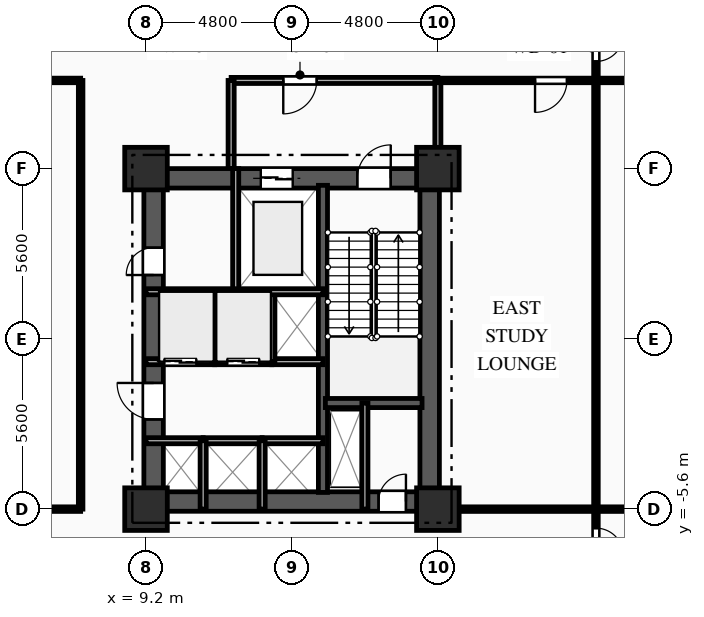
"""IFC4 building model, lengths in metres.
Left out: names, types, materials, properties, quantities, classifications, styles, units other than length and angle.
Written with IfcOpenShell. Run it as: python <this file> out.ifc"""

import sys

from ifc_helpers import new_model, si_unit, direction, frame, frame_2d, origin, origin_2d, place, context, subcontext, project, spatial, rectangle, extrude, element, fill, save


model = new_model("IFC4")
c1 = context("Model", 3, precision=1e-05, world=origin(), true_north=direction((0.0, 1.0)))
c2 = subcontext(c1, "Body", "Model", "MODEL_VIEW")
j1 = project(units=[si_unit("LENGTHUNIT", "METRE"), si_unit("PLANEANGLEUNIT", "RADIAN")], contexts=[c1])
p1 = place(None, origin())
s1 = spatial("IfcSite", under=j1, at=p1, CompositionType="ELEMENT")
p2 = place(p1, origin())
s2 = spatial("IfcBuilding", under=s1, at=p2, CompositionType="ELEMENT")
p3 = place(p2, frame((0.0, 0.0, 22.5)))
s3 = spatial("IfcBuildingStorey", under=s2, at=p3, CompositionType="ELEMENT", Elevation=22.5)
for number, where, z_axis, x_axis in (
    (1, (9.2, -5.6, 0.0), (0.0, 0.0, 1.0), (1.0, 0.0, 0.0)),
    (2, (9.2, 5.6, 0.0), (0.0, 0.0, 1.0), (1.0, 0.0, 0.0)),
    (3, (18.8, -5.6, 0.0), (0.0, 0.0, 1.0), (1.0, 0.0, 0.0)),
    (4, (18.8, 5.6, 0.0), (0.0, 0.0, 1.0), (1.0, 0.0, 0.0)),
):
    element("IfcColumn", number, at=place(p3, frame(where, z_axis=z_axis, x_axis=x_axis)), inside=s3, PredefinedType="COLUMN", context=c2, shape_type="SweptSolid", body=[
        extrude(rectangle(XDim=1.4, YDim=1.4, at=origin_2d()), origin(), (0.0, 0.0, 1.0), 4.5),
    ])
p4 = place(p3, frame((9.2, 5.28, 0.0), z_axis=(0.0, 0.0, 1.0), x_axis=(1.0, 0.0, 0.0)))
e5 = element("IfcWall", 5, at=p4, inside=s3, PredefinedType="SHEAR", context=c2, shape_type="SweptSolid", body=[
    extrude(rectangle(XDim=9.6, YDim=0.64, at=frame_2d((4.8, 0.0))), origin(), (0.0, 0.0, 1.0), 4.16),
])
p5 = place(p4, frame((6.95, 0.0, 0.0)))
e6 = element("IfcOpeningElement", 6, at=p5, cuts=e5, PredefinedType="OPENING", context=c2, shape_type="SweptSolid", body=[
    extrude(rectangle(XDim=1.1, YDim=2.15, at=frame_2d((0.55, 1.075))), frame((0.0, 0.33, 0.0), z_axis=(0.0, -1.0, 0.0), x_axis=(1.0, 0.0, 0.0)), (0.0, 0.0, 1.0), 0.66),
])
p6 = place(p4, frame((3.775, 0.0, 0.0)))
e7 = element("IfcOpeningElement", 7, at=p6, cuts=e5, PredefinedType="OPENING", context=c2, shape_type="SweptSolid", body=[
    extrude(rectangle(XDim=1.05, YDim=2.1, at=frame_2d((0.525, 1.05))), frame((0.0, 0.33, 0.0), z_axis=(0.0, -1.0, 0.0), x_axis=(1.0, 0.0, 0.0)), (0.0, 0.0, 1.0), 0.66),
])
p7 = place(p3, frame((9.2, -5.35, 0.0), z_axis=(0.0, 0.0, 1.0), x_axis=(1.0, 0.0, 0.0)))
e8 = element("IfcWall", 8, at=p7, inside=s3, PredefinedType="SHEAR", context=c2, shape_type="SweptSolid", body=[
    extrude(rectangle(XDim=9.6, YDim=0.64, at=frame_2d((4.8, 0.0))), origin(), (0.0, 0.0, 1.0), 4.16),
])
p8 = place(p7, frame((7.65, 0.0, 0.0)))
e9 = element("IfcOpeningElement", 9, at=p8, cuts=e8, PredefinedType="OPENING", context=c2, shape_type="SweptSolid", body=[
    extrude(rectangle(XDim=0.9, YDim=2.1, at=frame_2d((0.45, 1.05))), frame((0.0, 0.33, 0.0), z_axis=(0.0, -1.0, 0.0), x_axis=(1.0, 0.0, 0.0)), (0.0, 0.0, 1.0), 0.66),
])
p9 = place(p3, frame((9.45, -5.05, 0.0), z_axis=(0.0, 0.0, 1.0), x_axis=(0.0, 1.0, 0.0)))
e10 = element("IfcWall", 10, at=p9, inside=s3, PredefinedType="SHEAR", context=c2, shape_type="SweptSolid", body=[
    extrude(rectangle(XDim=10.1, YDim=0.64, at=frame_2d((5.05, 0.0))), origin(), (0.0, 0.0, 1.0), 4.16),
])
p10 = place(p9, frame((7.15, 0.0, 0.0)))
e11 = element("IfcOpeningElement", 11, at=p10, cuts=e10, PredefinedType="OPENING", context=c2, shape_type="SweptSolid", body=[
    extrude(rectangle(XDim=0.9, YDim=2.1, at=frame_2d((0.45, 1.05))), frame((0.0, 0.33, 0.0), z_axis=(0.0, -1.0, 0.0), x_axis=(1.0, 0.0, 0.0)), (0.0, 0.0, 1.0), 0.66),
])
p11 = place(p9, frame((2.4, 0.0, 0.0)))
e12 = element("IfcOpeningElement", 12, at=p11, cuts=e10, PredefinedType="OPENING", context=c2, shape_type="SweptSolid", body=[
    extrude(rectangle(XDim=1.2, YDim=2.15, at=frame_2d((0.6, 1.075))), frame((0.0, 0.33, 0.0), z_axis=(0.0, -1.0, 0.0), x_axis=(1.0, 0.0, 0.0)), (0.0, 0.0, 1.0), 0.66),
])
p12 = place(p3, frame((18.53, -5.05, 0.0), z_axis=(0.0, 0.0, 1.0), x_axis=(0.0, 1.0, 0.0)))
e13 = element("IfcWall", 13, at=p12, inside=s3, PredefinedType="SHEAR", context=c2, shape_type="SweptSolid", body=[
    extrude(rectangle(XDim=10.1, YDim=0.64, at=frame_2d((5.05, 0.0))), origin(), (0.0, 0.0, 1.0), 4.16),
])
p13 = place(p3, frame((15.02, -5.05, 0.0), z_axis=(0.0, 0.0, 1.0), x_axis=(0.0, 1.0, 0.0)))
e14 = element("IfcWall", 14, at=p13, inside=s3, PredefinedType="SHEAR", context=c2, shape_type="SweptSolid", body=[
    extrude(rectangle(XDim=10.1, YDim=0.3, at=frame_2d((5.05, 0.0))), origin(), (0.0, 0.0, 1.0), 4.16),
])
p14 = place(p3, frame((15.1, -2.11, 0.0), z_axis=(0.0, 0.0, 1.0), x_axis=(1.0, 0.0, 0.0)))
e15 = element("IfcWall", 15, at=p14, inside=s3, PredefinedType="SHEAR", context=c2, shape_type="SweptSolid", body=[
    extrude(rectangle(XDim=3.18, YDim=0.3, at=frame_2d((1.59, 0.0))), origin(), (0.0, 0.0, 1.0), 4.16),
])
p15 = place(p3, frame((16.4, -2.11, 0.0), z_axis=(0.0, 0.0, 1.0), x_axis=(0.0, -1.0, 0.0)))
e16 = element("IfcWall", 16, at=p15, inside=s3, PredefinedType="PARTITIONING", context=c2, shape_type="SweptSolid", body=[
    extrude(rectangle(XDim=3.49, YDim=0.2, at=frame_2d((1.745, 0.0))), origin(), (0.0, 0.0, 1.0), 4.16),
])
p16 = place(p3, frame((12.15, 5.6, 0.0), z_axis=(0.0, 0.0, 1.0), x_axis=(0.0, -1.0, 0.0)))
e17 = element("IfcWall", 17, at=p16, inside=s3, PredefinedType="PARTITIONING", context=c2, shape_type="SweptSolid", body=[
    extrude(rectangle(XDim=4.05, YDim=0.2, at=frame_2d((2.025, 0.0))), origin(), (0.0, 0.0, 1.0), 4.16),
])
p17 = place(p3, frame((18.8, 8.5, 0.0), z_axis=(0.0, 0.0, 1.0), x_axis=(-1.0, 0.0, 0.0)))
e18 = element("IfcWall", 18, at=p17, inside=s3, PredefinedType="PARTITIONING", context=c2, shape_type="SweptSolid", body=[
    extrude(rectangle(XDim=6.8, YDim=0.2, at=frame_2d((3.4, 0.0))), origin(), (0.0, 0.0, 1.0), 4.16),
])
p18 = place(p17, frame((3.985, 0.0, 0.0)))
e19 = element("IfcOpeningElement", 19, at=p18, cuts=e18, PredefinedType="OPENING", context=c2, shape_type="SweptSolid", body=[
    extrude(rectangle(XDim=1.1, YDim=2.15, at=frame_2d((0.55, 1.075))), frame((0.0, 0.11, 0.0), z_axis=(0.0, -1.0, 0.0), x_axis=(1.0, 0.0, 0.0)), (0.0, 0.0, 1.0), 0.22),
])
p19 = place(p3, frame((12.0, 8.5, 0.0), z_axis=(0.0, 0.0, 1.0), x_axis=(0.0, -1.0, 0.0)))
e20 = element("IfcWall", 20, at=p19, inside=s3, PredefinedType="PARTITIONING", context=c2, shape_type="SweptSolid", body=[
    extrude(rectangle(XDim=2.9, YDim=0.2, at=frame_2d((1.45, 0.0))), origin(), (0.0, 0.0, 1.0), 4.16),
])
p20 = place(p3, frame((18.8, 5.6, 0.0), z_axis=(0.0, 0.0, 1.0), x_axis=(0.0, 1.0, 0.0)))
e21 = element("IfcWall", 21, at=p20, inside=s3, PredefinedType="PARTITIONING", context=c2, shape_type="SweptSolid", body=[
    extrude(rectangle(XDim=2.9, YDim=0.2, at=frame_2d((1.45, 0.0))), origin(), (0.0, 0.0, 1.0), 3.645),
])
p21 = place(p3, frame((9.2, -3.35, 0.0), z_axis=(0.0, 0.0, 1.0), x_axis=(1.0, 0.0, 0.0)))
e22 = element("IfcWall", 22, at=p21, inside=s3, PredefinedType="PARTITIONING", context=c2, shape_type="SweptSolid", body=[
    extrude(rectangle(XDim=1.88, YDim=0.2, at=frame_2d((0.94, 0.0))), origin(), (0.0, 0.0, 1.0), 3.875),
])
p22 = place(p3, frame((11.08, -3.35, 0.0), z_axis=(0.0, 0.0, 1.0), x_axis=(1.0, 0.0, 0.0)))
e23 = element("IfcWall", 23, at=p22, inside=s3, PredefinedType="PARTITIONING", context=c2, shape_type="SweptSolid", body=[
    extrude(rectangle(XDim=1.94, YDim=0.2, at=frame_2d((0.97, 0.0))), origin(), (0.0, 0.0, 1.0), 4.16),
])
p23 = place(p3, frame((13.02, -3.35, 0.0), z_axis=(0.0, 0.0, 1.0), x_axis=(1.0, 0.0, 0.0)))
e24 = element("IfcWall", 24, at=p23, inside=s3, PredefinedType="PARTITIONING", context=c2, shape_type="SweptSolid", body=[
    extrude(rectangle(XDim=2.0, YDim=0.2, at=frame_2d((1.0, 0.0))), origin(), (0.0, 0.0, 1.0), 4.16),
])
p24 = place(p3, frame((11.46, -0.75, 0.0), z_axis=(0.0, 0.0, 1.0), x_axis=(-1.0, 0.0, 0.0)))
e25 = element("IfcWall", 25, at=p24, inside=s3, PredefinedType="PARTITIONING", context=c2, shape_type="SweptSolid", body=[
    extrude(rectangle(XDim=2.26, YDim=0.2, at=frame_2d((1.13, 0.0))), origin(), (0.0, 0.0, 1.0), 4.16),
])
p25 = place(p24, frame((0.605, 0.0, 0.0)))
e26 = element("IfcOpeningElement", 26, at=p25, cuts=e25, PredefinedType="OPENING", context=c2, shape_type="SweptSolid", body=[
    extrude(rectangle(XDim=1.05, YDim=2.1, at=frame_2d((0.525, 1.05))), frame((0.0, 0.11, 0.0), z_axis=(0.0, -1.0, 0.0), x_axis=(1.0, 0.0, 0.0)), (0.0, 0.0, 1.0), 0.22),
])
p26 = place(p3, frame((13.34, -0.75, 0.0), z_axis=(0.0, 0.0, 1.0), x_axis=(-1.0, 0.0, 0.0)))
e27 = element("IfcWall", 27, at=p26, inside=s3, PredefinedType="PARTITIONING", context=c2, shape_type="SweptSolid", body=[
    extrude(rectangle(XDim=1.88, YDim=0.2, at=frame_2d((0.94, 0.0))), origin(), (0.0, 0.0, 1.0), 4.16),
])
p27 = place(p26, frame((0.415, 0.0, 0.0)))
e28 = element("IfcOpeningElement", 28, at=p27, cuts=e27, PredefinedType="OPENING", context=c2, shape_type="SweptSolid", body=[
    extrude(rectangle(XDim=1.05, YDim=2.1, at=frame_2d((0.525, 1.05))), frame((0.0, 0.11, 0.0), z_axis=(0.0, -1.0, 0.0), x_axis=(1.0, 0.0, 0.0)), (0.0, 0.0, 1.0), 0.22),
])
p28 = place(p3, frame((15.02, -0.75, 0.0), z_axis=(0.0, 0.0, 1.0), x_axis=(-1.0, 0.0, 0.0)))
e29 = element("IfcWall", 29, at=p28, inside=s3, PredefinedType="PARTITIONING", context=c2, shape_type="SweptSolid", body=[
    extrude(rectangle(XDim=1.68, YDim=0.2, at=frame_2d((0.84, 0.0))), origin(), (0.0, 0.0, 1.0), 4.16),
])
for number, where, z_axis, x_axis in (
    (30, (11.08, -5.6, 0.0), (0.0, 0.0, 1.0), (0.0, 1.0, 0.0)),
    (31, (13.02, -5.6, 0.0), (0.0, 0.0, 1.0), (0.0, 1.0, 0.0)),
):
    element("IfcWall", number, at=place(p3, frame(where, z_axis=z_axis, x_axis=x_axis)), inside=s3, PredefinedType="PARTITIONING", context=c2, shape_type="SweptSolid", body=[
        extrude(rectangle(XDim=2.25, YDim=0.2, at=frame_2d((1.125, 0.0))), origin(), (0.0, 0.0, 1.0), 4.16),
    ])
for number, where, z_axis, x_axis in (
    (32, (11.46, -0.75, 0.0), (0.0, 0.0, 1.0), (0.0, 1.0, 0.0)),
    (33, (13.34, -0.75, 0.0), (0.0, 0.0, 1.0), (0.0, 1.0, 0.0)),
):
    element("IfcWall", number, at=place(p3, frame(where, z_axis=z_axis, x_axis=x_axis)), inside=s3, PredefinedType="PARTITIONING", context=c2, shape_type="SweptSolid", body=[
        extrude(rectangle(XDim=2.3, YDim=0.2, at=frame_2d((1.15, 0.0))), origin(), (0.0, 0.0, 1.0), 4.16),
    ])
p29 = place(p3, frame((24.0, 10.65, 0.0), z_axis=(0.0, 0.0, 1.0), x_axis=(0.0, -1.0, 0.0)))
e34 = element("IfcWall", 34, at=p29, inside=s3, PredefinedType="PARTITIONING", context=c2, shape_type="SweptSolid", body=[
    extrude(rectangle(XDim=2.15, YDim=0.15, at=frame_2d((1.075, 0.0))), origin(), (0.0, 0.0, 1.0), 4.16),
])
p30 = place(p29, frame((0.625, 0.0, 0.0)))
e35 = element("IfcOpeningElement", 35, at=p30, cuts=e34, PredefinedType="OPENING", context=c2, shape_type="SweptSolid", body=[
    extrude(rectangle(XDim=0.9, YDim=2.1, at=frame_2d((0.45, 1.05))), frame((0.0, 0.085, 0.0), z_axis=(0.0, -1.0, 0.0), x_axis=(1.0, 0.0, 0.0)), (0.0, 0.0, 1.0), 0.17),
])
p31 = place(p3, frame((24.0, 8.5, 0.0), z_axis=(0.0, 0.0, 1.0), x_axis=(-1.0, 0.0, 0.0)))
e36 = element("IfcWall", 36, at=p31, inside=s3, PredefinedType="PARTITIONING", context=c2, shape_type="SweptSolid", body=[
    extrude(rectangle(XDim=5.2, YDim=0.15, at=frame_2d((2.6, 0.0))), origin(), (0.0, 0.0, 1.0), 4.16),
])
p32 = place(p31, frame((0.954, 0.0, 0.0)))
e37 = element("IfcOpeningElement", 37, at=p32, cuts=e36, PredefinedType="OPENING", context=c2, shape_type="SweptSolid", body=[
    extrude(rectangle(XDim=1.05, YDim=2.15, at=frame_2d((0.525, 1.075))), frame((0.0, 0.085, 0.0), z_axis=(0.0, -1.0, 0.0), x_axis=(1.0, 0.0, 0.0)), (0.0, 0.0, 1.0), 0.17),
])
p33 = place(p3, frame((7.05, 8.5, 0.0), z_axis=(0.0, 0.0, 1.0), x_axis=(-1.0, 0.0, 0.0)))
e38 = element("IfcWall", 38, at=p33, inside=s3, PredefinedType="PARTITIONING", context=c2, shape_type="SweptSolid", body=[
    extrude(rectangle(XDim=7.05, YDim=0.15, at=frame_2d((3.525, 0.0))), origin(), (0.0, 0.0, 1.0), 4.16),
])
p34 = place(p3, frame((24.0, -5.6, 0.0), z_axis=(0.0, 0.0, 1.0), x_axis=(0.0, -1.0, 0.0)))
e39 = element("IfcWall", 39, at=p34, inside=s3, PredefinedType="PARTITIONING", context=c2, shape_type="SweptSolid", body=[
    extrude(rectangle(XDim=2.15, YDim=0.15, at=frame_2d((1.075, 0.0))), origin(), (0.0, 0.0, 1.0), 4.16),
])
p35 = place(p34, frame((0.625, 0.0, 0.0)))
e40 = element("IfcOpeningElement", 40, at=p35, cuts=e39, PredefinedType="OPENING", context=c2, shape_type="SweptSolid", body=[
    extrude(rectangle(XDim=0.9, YDim=2.1, at=frame_2d((0.45, 1.05))), frame((0.0, 0.085, 0.0), z_axis=(0.0, -1.0, 0.0), x_axis=(1.0, 0.0, 0.0)), (0.0, 0.0, 1.0), 0.17),
])
p36 = place(p3, frame((18.8, -5.6, 0.0), z_axis=(0.0, 0.0, 1.0), x_axis=(1.0, 0.0, 0.0)))
e41 = element("IfcWall", 41, at=p36, inside=s3, PredefinedType="PARTITIONING", context=c2, shape_type="SweptSolid", body=[
    extrude(rectangle(XDim=5.2, YDim=0.15, at=frame_2d((2.6, 0.0))), origin(), (0.0, 0.0, 1.0), 4.16),
])
p37 = place(p3, frame((0.0, -5.6, 0.0), z_axis=(0.0, 0.0, 1.0), x_axis=(1.0, 0.0, 0.0)))
e42 = element("IfcWall", 42, at=p37, inside=s3, PredefinedType="PARTITIONING", context=c2, shape_type="SweptSolid", body=[
    extrude(rectangle(XDim=7.05, YDim=0.15, at=frame_2d((3.525, 0.0))), origin(), (0.0, 0.0, 1.0), 3.137),
])
p38 = place(p3, frame((7.05, -5.6, 0.0), z_axis=(0.0, 0.0, 1.0), x_axis=(0.0, 1.0, 0.0)))
e43 = element("IfcWall", 43, at=p38, inside=s3, PredefinedType="PARTITIONING", context=c2, shape_type="SweptSolid", body=[
    extrude(rectangle(XDim=14.1, YDim=0.15, at=frame_2d((7.05, 0.0))), origin(), (0.0, 0.0, 1.0), 4.16),
])
p39 = place(p3, frame((24.0, 8.5, 0.0), z_axis=(0.0, 0.0, 1.0), x_axis=(1.0, 0.0, 0.0)))
e44 = element("IfcWall", 44, at=p39, inside=s3, PredefinedType="PARTITIONING", context=c2, shape_type="SweptSolid", body=[
    extrude(rectangle(XDim=2.65, YDim=0.15, at=frame_2d((1.325, 0.0))), origin(), (0.0, 0.0, 1.0), 4.16),
])
p40 = place(p39, frame((0.965, 0.0, 0.0)))
e45 = element("IfcOpeningElement", 45, at=p40, cuts=e44, PredefinedType="OPENING", context=c2, shape_type="SweptSolid", body=[
    extrude(rectangle(XDim=1.05, YDim=2.15, at=frame_2d((0.525, 1.075))), frame((0.0, 0.085, 0.0), z_axis=(0.0, -1.0, 0.0), x_axis=(1.0, 0.0, 0.0)), (0.0, 0.0, 1.0), 0.17),
])
p41 = place(p3, frame((26.65, -5.6, 0.0), z_axis=(0.0, 0.0, 1.0), x_axis=(-1.0, 0.0, 0.0)))
e46 = element("IfcWall", 46, at=p41, inside=s3, PredefinedType="PARTITIONING", context=c2, shape_type="SweptSolid", body=[
    extrude(rectangle(XDim=2.65, YDim=0.15, at=frame_2d((1.325, 0.0))), origin(), (0.0, 0.0, 1.0), 4.16),
])
p42 = place(p41, frame((0.635, 0.0, 0.0)))
e47 = element("IfcOpeningElement", 47, at=p42, cuts=e46, PredefinedType="OPENING", context=c2, shape_type="SweptSolid", body=[
    extrude(rectangle(XDim=1.05, YDim=2.15, at=frame_2d((0.525, 1.075))), frame((0.0, 0.085, 0.0), z_axis=(0.0, -1.0, 0.0), x_axis=(1.0, 0.0, 0.0)), (0.0, 0.0, 1.0), 0.17),
])
p43 = place(p3, frame((24.0, -5.6, 0.0), z_axis=(0.0, 0.0, 1.0), x_axis=(0.0, 1.0, 0.0)))
e48 = element("IfcWall", 48, at=p43, inside=s3, PredefinedType="PARTITIONING", context=c2, shape_type="SweptSolid", body=[
    extrude(rectangle(XDim=14.1, YDim=0.15, at=frame_2d((7.05, 0.0))), origin(), (0.0, 0.0, 1.0), 4.16),
])
p44 = place(p3, frame((9.2, 1.55, 0.0), z_axis=(0.0, 0.0, 1.0), x_axis=(1.0, 0.0, 0.0)))
e49 = element("IfcWall", 49, at=p44, inside=s3, PredefinedType="PARTITIONING", context=c2, shape_type="SweptSolid", body=[
    extrude(rectangle(XDim=5.82, YDim=0.2, at=frame_2d((2.91, 0.0))), origin(), (0.0, 0.0, 1.0), 4.16),
])
p45 = place(p5, origin())
e50 = element("IfcDoor", 50, at=p45, inside=s3, OperationType="SINGLE_SWING_RIGHT", PredefinedType="DOOR", context=c2, shape_type="SweptSolid", body=[
    extrude(rectangle(XDim=1.1, YDim=2.15, at=frame_2d((0.55, 1.075))), frame((0.0, 0.025, 0.0), z_axis=(0.0, -1.0, 0.0), x_axis=(1.0, 0.0, 0.0)), (0.0, 0.0, 1.0), 0.05),
])
fill(e6, e50)
p46 = place(p6, origin())
e51 = element("IfcDoor", 51, at=p46, inside=s3, OperationType="DOUBLE_DOOR_SLIDING", PredefinedType="DOOR", context=c2, shape_type="SweptSolid", body=[
    extrude(rectangle(XDim=1.05, YDim=2.1, at=frame_2d((0.525, 1.05))), frame((0.0, 0.025, 0.0), z_axis=(0.0, -1.0, 0.0), x_axis=(1.0, 0.0, 0.0)), (0.0, 0.0, 1.0), 0.05),
])
fill(e7, e51)
p47 = place(p8, origin())
e52 = element("IfcDoor", 52, at=p47, inside=s3, OperationType="SINGLE_SWING_RIGHT", PredefinedType="DOOR", context=c2, shape_type="SweptSolid", body=[
    extrude(rectangle(XDim=0.9, YDim=2.1, at=frame_2d((0.45, 1.05))), frame((0.0, 0.025, 0.0), z_axis=(0.0, -1.0, 0.0), x_axis=(1.0, 0.0, 0.0)), (0.0, 0.0, 1.0), 0.05),
])
fill(e9, e52)
p48 = place(p18, origin())
e53 = element("IfcDoor", 53, at=p48, inside=s3, OperationType="SINGLE_SWING_RIGHT", PredefinedType="DOOR", context=c2, shape_type="SweptSolid", body=[
    extrude(rectangle(XDim=1.1, YDim=2.15, at=frame_2d((0.55, 1.075))), frame((0.0, 0.025, 0.0), z_axis=(0.0, -1.0, 0.0), x_axis=(1.0, 0.0, 0.0)), (0.0, 0.0, 1.0), 0.05),
])
fill(e19, e53)
p49 = place(p10, origin())
e54 = element("IfcDoor", 54, at=p49, inside=s3, OperationType="SINGLE_SWING_LEFT", PredefinedType="DOOR", context=c2, shape_type="SweptSolid", body=[
    extrude(rectangle(XDim=0.9, YDim=2.1, at=frame_2d((0.45, 1.05))), frame((0.0, 0.025, 0.0), z_axis=(0.0, -1.0, 0.0), x_axis=(1.0, 0.0, 0.0)), (0.0, 0.0, 1.0), 0.05),
])
fill(e11, e54)
p50 = place(p25, origin())
e55 = element("IfcDoor", 55, at=p50, inside=s3, OperationType="DOUBLE_DOOR_SLIDING", PredefinedType="DOOR", context=c2, shape_type="SweptSolid", body=[
    extrude(rectangle(XDim=1.05, YDim=2.1, at=frame_2d((0.525, 1.05))), frame((0.0, 0.025, 0.0), z_axis=(0.0, -1.0, 0.0), x_axis=(1.0, 0.0, 0.0)), (0.0, 0.0, 1.0), 0.05),
])
fill(e26, e55)
p51 = place(p27, origin())
e56 = element("IfcDoor", 56, at=p51, inside=s3, OperationType="DOUBLE_DOOR_SLIDING", PredefinedType="DOOR", context=c2, shape_type="SweptSolid", body=[
    extrude(rectangle(XDim=1.05, YDim=2.1, at=frame_2d((0.525, 1.05))), frame((0.0, 0.025, 0.0), z_axis=(0.0, -1.0, 0.0), x_axis=(1.0, 0.0, 0.0)), (0.0, 0.0, 1.0), 0.05),
])
fill(e28, e56)
p52 = place(p11, origin())
e57 = element("IfcDoor", 57, at=p52, inside=s3, OperationType="SINGLE_SWING_RIGHT", PredefinedType="DOOR", context=c2, shape_type="SweptSolid", body=[
    extrude(rectangle(XDim=1.2, YDim=2.15, at=frame_2d((0.6, 1.075))), frame((0.0, 0.025, 0.0), z_axis=(0.0, -1.0, 0.0), x_axis=(1.0, 0.0, 0.0)), (0.0, 0.0, 1.0), 0.05),
])
fill(e12, e57)
p53 = place(p30, origin())
e58 = element("IfcDoor", 58, at=p53, inside=s3, OperationType="SINGLE_SWING_LEFT", PredefinedType="DOOR", context=c2, shape_type="SweptSolid", body=[
    extrude(rectangle(XDim=0.9, YDim=2.1, at=frame_2d((0.45, 1.05))), frame((0.0, 0.025, 0.0), z_axis=(0.0, -1.0, 0.0), x_axis=(1.0, 0.0, 0.0)), (0.0, 0.0, 1.0), 0.05),
])
fill(e35, e58)
p54 = place(p32, origin())
e59 = element("IfcDoor", 59, at=p54, inside=s3, OperationType="SINGLE_SWING_RIGHT", PredefinedType="DOOR", context=c2, shape_type="SweptSolid", body=[
    extrude(rectangle(XDim=1.05, YDim=2.15, at=frame_2d((0.525, 1.075))), frame((0.0, 0.025, 0.0), z_axis=(0.0, -1.0, 0.0), x_axis=(1.0, 0.0, 0.0)), (0.0, 0.0, 1.0), 0.05),
])
fill(e37, e59)
p55 = place(p35, origin())
e60 = element("IfcDoor", 60, at=p55, inside=s3, OperationType="SINGLE_SWING_RIGHT", PredefinedType="DOOR", context=c2, shape_type="SweptSolid", body=[
    extrude(rectangle(XDim=0.9, YDim=2.1, at=frame_2d((0.45, 1.05))), frame((0.0, 0.025, 0.0), z_axis=(0.0, -1.0, 0.0), x_axis=(1.0, 0.0, 0.0)), (0.0, 0.0, 1.0), 0.05),
])
fill(e40, e60)
save(model, sys.argv[1])
